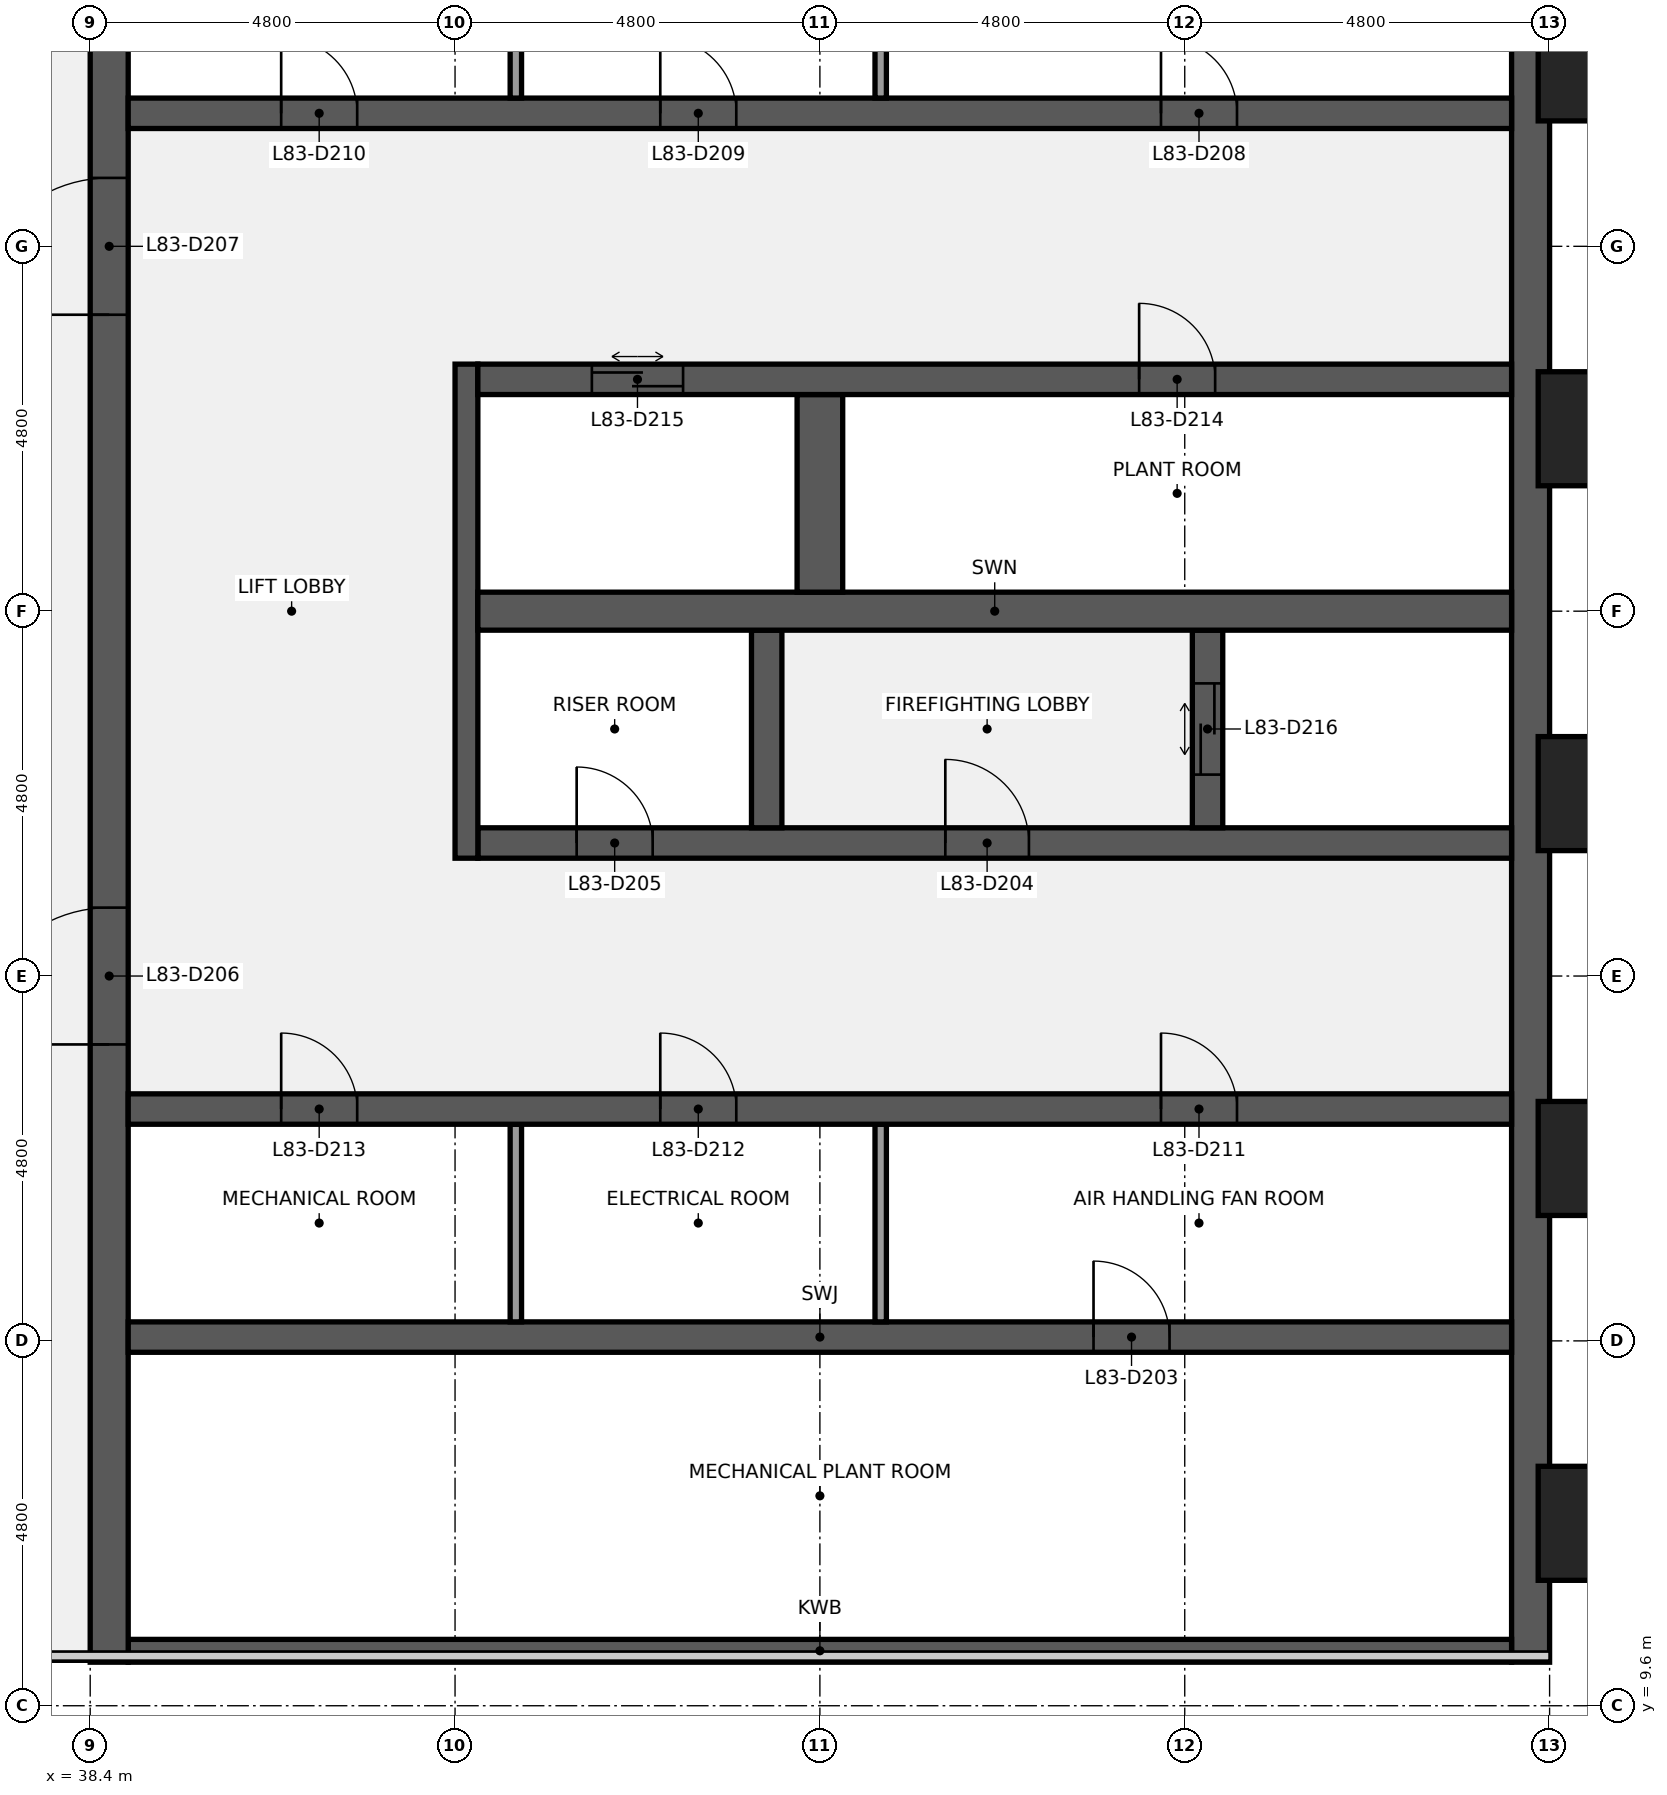
"""IFC4 building model, lengths in metres.
Left out: names, types, materials, properties, quantities, classifications, styles, units other than length and angle.
Written with IfcOpenShell. Run it as: python <this file> out.ifc"""

import sys

from ifc_helpers import new_model, si_unit, direction, frame, frame_2d, origin, origin_2d, place, context, subcontext, project, spatial, polyline, rectangle, outline, extrude, element, fill, save


model = new_model("IFC4")
c1 = context("Model", 3, precision=1e-05, world=origin(), true_north=direction((0.0, 1.0)))
c2 = subcontext(c1, "Body", "Model", "MODEL_VIEW")
j1 = project(units=[si_unit("LENGTHUNIT", "METRE"), si_unit("PLANEANGLEUNIT", "RADIAN")], contexts=[c1])
p1 = place(None, origin())
s1 = spatial("IfcSite", under=j1, at=p1, CompositionType="ELEMENT")
p2 = place(p1, origin())
s2 = spatial("IfcBuilding", under=s1, at=p2, CompositionType="ELEMENT")
p3 = place(p2, frame((0.0, 0.0, 370.3)))
s3 = spatial("IfcBuildingStorey", under=s2, at=p3, CompositionType="ELEMENT", Elevation=370.3)
p4 = place(p3, frame((57.35, 38.4, 0.0), z_axis=(0.0, 0.0, 1.0), x_axis=(0.0, -1.0, 0.0)))
e1 = element("IfcWall", 1, at=p4, inside=s3, PredefinedType="SHEAR", context=c2, shape_type="SweptSolid", body=[
    extrude(outline(polyline([(0.0, 0.0), (28.227, 0.0), (28.227, 2.488), (26.98, 3.75), (0.0, 3.75), (0.0, 0.0)])), frame((0.0, 0.25, 0.0), z_axis=(0.0, -1.0, 0.0), x_axis=(1.0, 0.0, 0.0)), (0.0, 0.0, 1.0), 0.5),
])
p5 = place(p3, frame((57.1, 10.323, 0.0), z_axis=(0.0, 0.0, 1.0), x_axis=(-1.0, 0.0, 0.0)))
e2 = element("IfcWall", 2, at=p5, inside=s3, PredefinedType="SHEAR", context=c2, shape_type="SweptSolid", body=[
    extrude(outline(polyline([(0.0, 0.0), (18.2, 0.0), (18.2, 2.639), (0.0, 2.639), (0.0, 0.0)])), frame((0.0, 0.15, 0.0), z_axis=(0.0, -1.0, 0.0), x_axis=(1.0, 0.0, 0.0)), (0.0, 0.0, 1.0), 0.3),
])
p6 = place(p3, frame((38.65, 10.173, 0.0), z_axis=(0.0, 0.0, 1.0), x_axis=(0.0, 1.0, 0.0)))
e3 = element("IfcWall", 3, at=p6, inside=s3, PredefinedType="SHEAR", context=c2, shape_type="SweptSolid", body=[
    extrude(outline(polyline([(0.0, 0.0), (28.227, 0.0), (28.227, 3.75), (1.247, 3.75), (0.0, 2.488), (0.0, 0.0)])), frame((0.0, 0.25, 0.0), z_axis=(0.0, -1.0, 0.0), x_axis=(1.0, 0.0, 0.0)), (0.0, 0.0, 1.0), 0.5),
])
p7 = place(p6, frame((8.127, 0.0, 0.0)))
e4 = element("IfcOpeningElement", 4, at=p7, cuts=e3, PredefinedType="OPENING", context=c2, shape_type="SweptSolid", body=[
    extrude(rectangle(XDim=1.8, YDim=2.1, at=frame_2d((0.9, 1.05))), frame((0.0, 0.26, 0.0), z_axis=(0.0, -1.0, 0.0), x_axis=(1.0, 0.0, 0.0)), (0.0, 0.0, 1.0), 0.52),
])
p8 = place(p6, frame((17.727, 0.0, 0.0)))
e5 = element("IfcOpeningElement", 5, at=p8, cuts=e3, PredefinedType="OPENING", context=c2, shape_type="SweptSolid", body=[
    extrude(rectangle(XDim=1.8, YDim=2.1, at=frame_2d((0.9, 1.05))), frame((0.0, 0.26, 0.0), z_axis=(0.0, -1.0, 0.0), x_axis=(1.0, 0.0, 0.0)), (0.0, 0.0, 1.0), 0.52),
])
p9 = place(p3, frame((38.9, 14.45, 0.0), z_axis=(0.0, 0.0, 1.0), x_axis=(1.0, 0.0, 0.0)))
e6 = element("IfcWall", 6, at=p9, inside=s3, PredefinedType="SHEAR", context=c2, shape_type="SweptSolid", body=[
    extrude(rectangle(XDim=18.2, YDim=0.4, at=frame_2d((9.1, 0.0))), origin(), (0.0, 0.0, 1.0), 3.75),
])
p10 = place(p9, frame((12.7, 0.0, 0.0)))
e7 = element("IfcOpeningElement", 7, at=p10, cuts=e6, PredefinedType="OPENING", context=c2, shape_type="SweptSolid", body=[
    extrude(rectangle(XDim=1.0, YDim=2.1, at=frame_2d((0.5, 1.05))), frame((0.0, 0.21, 0.0), z_axis=(0.0, -1.0, 0.0), x_axis=(1.0, 0.0, 0.0)), (0.0, 0.0, 1.0), 0.42),
])
for number, where, z_axis, x_axis in (
    (8, (48.8, 14.65, 0.0), (0.0, 0.0, 1.0), (0.0, 1.0, 0.0)),
    (9, (44.0, 14.65, 0.0), (0.0, 0.0, 1.0), (0.0, 1.0, 0.0)),
):
    element("IfcWall", number, at=place(p3, frame(where, z_axis=z_axis, x_axis=x_axis)), inside=s3, PredefinedType="PARTITIONING", context=c2, shape_type="SweptSolid", body=[
        extrude(rectangle(XDim=2.6, YDim=0.15, at=frame_2d((1.3, 0.0))), origin(), (0.0, 0.0, 1.0), 3.75),
    ])
p11 = place(p3, frame((38.9, 17.45, 0.0), z_axis=(0.0, 0.0, 1.0), x_axis=(1.0, 0.0, 0.0)))
e10 = element("IfcWall", 10, at=p11, inside=s3, PredefinedType="SHEAR", context=c2, shape_type="SweptSolid", body=[
    extrude(rectangle(XDim=18.2, YDim=0.4, at=frame_2d((9.1, 0.0))), origin(), (0.0, 0.0, 1.0), 3.75),
])
p12 = place(p11, frame((13.587, 0.0, 0.0)))
e11 = element("IfcOpeningElement", 11, at=p12, cuts=e10, PredefinedType="OPENING", context=c2, shape_type="SweptSolid", body=[
    extrude(rectangle(XDim=1.0, YDim=2.1, at=frame_2d((0.5, 1.05))), frame((0.0, 0.21, 0.0), z_axis=(0.0, -1.0, 0.0), x_axis=(1.0, 0.0, 0.0)), (0.0, 0.0, 1.0), 0.42),
])
p13 = place(p11, frame((7.0, 0.0, 0.0)))
e12 = element("IfcOpeningElement", 12, at=p13, cuts=e10, PredefinedType="OPENING", context=c2, shape_type="SweptSolid", body=[
    extrude(rectangle(XDim=1.0, YDim=2.1, at=frame_2d((0.5, 1.05))), frame((0.0, 0.21, 0.0), z_axis=(0.0, -1.0, 0.0), x_axis=(1.0, 0.0, 0.0)), (0.0, 0.0, 1.0), 0.42),
])
p14 = place(p11, frame((2.012, 0.0, 0.0)))
e13 = element("IfcOpeningElement", 13, at=p14, cuts=e10, PredefinedType="OPENING", context=c2, shape_type="SweptSolid", body=[
    extrude(rectangle(XDim=1.0, YDim=2.1, at=frame_2d((0.5, 1.05))), frame((0.0, 0.21, 0.0), z_axis=(0.0, -1.0, 0.0), x_axis=(1.0, 0.0, 0.0)), (0.0, 0.0, 1.0), 0.42),
])
p15 = place(p3, frame((43.5, 20.95, 0.0), z_axis=(0.0, 0.0, 1.0), x_axis=(1.0, 0.0, 0.0)))
e14 = element("IfcWall", 14, at=p15, inside=s3, PredefinedType="SHEAR", context=c2, shape_type="SweptSolid", body=[
    extrude(rectangle(XDim=13.6, YDim=0.4, at=frame_2d((6.8, 0.0))), origin(), (0.0, 0.0, 1.0), 3.75),
])
p16 = place(p15, frame((6.15, 0.0, 0.0)))
e15 = element("IfcOpeningElement", 15, at=p16, cuts=e14, PredefinedType="OPENING", context=c2, shape_type="SweptSolid", body=[
    extrude(rectangle(XDim=1.1, YDim=2.1, at=frame_2d((0.55, 1.05))), frame((0.0, 0.21, 0.0), z_axis=(0.0, -1.0, 0.0), x_axis=(1.0, 0.0, 0.0)), (0.0, 0.0, 1.0), 0.42),
])
p17 = place(p15, frame((1.3, 0.0, 0.0)))
e16 = element("IfcOpeningElement", 16, at=p17, cuts=e14, PredefinedType="OPENING", context=c2, shape_type="SweptSolid", body=[
    extrude(rectangle(XDim=1.0, YDim=2.1, at=frame_2d((0.5, 1.05))), frame((0.0, 0.21, 0.0), z_axis=(0.0, -1.0, 0.0), x_axis=(1.0, 0.0, 0.0)), (0.0, 0.0, 1.0), 0.42),
])
p18 = place(p3, frame((43.35, 20.75, 0.0), z_axis=(0.0, 0.0, 1.0), x_axis=(0.0, 1.0, 0.0)))
e17 = element("IfcWall", 17, at=p18, inside=s3, PredefinedType="SHEAR", context=c2, shape_type="SweptSolid", body=[
    extrude(rectangle(XDim=6.5, YDim=0.3, at=frame_2d((3.25, 0.0))), origin(), (0.0, 0.0, 1.0), 3.75),
])
p19 = place(p3, frame((53.1, 21.15, 0.0), z_axis=(0.0, 0.0, 1.0), x_axis=(0.0, 1.0, 0.0)))
e18 = element("IfcWall", 18, at=p19, inside=s3, PredefinedType="SHEAR", context=c2, shape_type="SweptSolid", body=[
    extrude(rectangle(XDim=2.6, YDim=0.4, at=frame_2d((1.3, 0.0))), origin(), (0.0, 0.0, 1.0), 3.75),
])
p20 = place(p19, frame((0.7, 0.0, 0.0)))
e19 = element("IfcOpeningElement", 19, at=p20, cuts=e18, PredefinedType="OPENING", context=c2, shape_type="SweptSolid", body=[
    extrude(rectangle(XDim=1.2, YDim=2.1, at=frame_2d((0.6, 1.05))), frame((0.0, 0.21, 0.0), z_axis=(0.0, -1.0, 0.0), x_axis=(1.0, 0.0, 0.0)), (0.0, 0.0, 1.0), 0.42),
])
p21 = place(p3, frame((47.3, 21.15, 0.0), z_axis=(0.0, 0.0, 1.0), x_axis=(0.0, 1.0, 0.0)))
e20 = element("IfcWall", 20, at=p21, inside=s3, PredefinedType="SHEAR", context=c2, shape_type="SweptSolid", body=[
    extrude(rectangle(XDim=2.6, YDim=0.4, at=frame_2d((1.3, 0.0))), origin(), (0.0, 0.0, 1.0), 3.75),
])
p22 = place(p3, frame((43.5, 24.0, 0.0), z_axis=(0.0, 0.0, 1.0), x_axis=(1.0, 0.0, 0.0)))
e21 = element("IfcWall", 21, at=p22, inside=s3, PredefinedType="SHEAR", context=c2, shape_type="SweptSolid", body=[
    extrude(rectangle(XDim=13.6, YDim=0.5, at=frame_2d((6.8, 0.0))), origin(), (0.0, 0.0, 1.0), 3.75),
])
p23 = place(p3, frame((48.0, 24.25, 0.0), z_axis=(0.0, 0.0, 1.0), x_axis=(0.0, 1.0, 0.0)))
e22 = element("IfcWall", 22, at=p23, inside=s3, PredefinedType="SHEAR", context=c2, shape_type="SweptSolid", body=[
    extrude(rectangle(XDim=2.6, YDim=0.6, at=frame_2d((1.3, 0.0))), origin(), (0.0, 0.0, 1.0), 3.75),
])
p24 = place(p3, frame((43.5, 27.05, 0.0), z_axis=(0.0, 0.0, 1.0), x_axis=(1.0, 0.0, 0.0)))
e23 = element("IfcWall", 23, at=p24, inside=s3, PredefinedType="SHEAR", context=c2, shape_type="SweptSolid", body=[
    extrude(rectangle(XDim=13.6, YDim=0.4, at=frame_2d((6.8, 0.0))), origin(), (0.0, 0.0, 1.0), 3.75),
])
p25 = place(p24, frame((8.7, 0.0, 0.0)))
e24 = element("IfcOpeningElement", 24, at=p25, cuts=e23, PredefinedType="OPENING", context=c2, shape_type="SweptSolid", body=[
    extrude(rectangle(XDim=1.0, YDim=2.1, at=frame_2d((0.5, 1.05))), frame((0.0, 0.21, 0.0), z_axis=(0.0, -1.0, 0.0), x_axis=(1.0, 0.0, 0.0)), (0.0, 0.0, 1.0), 0.42),
])
p26 = place(p24, frame((1.5, 0.0, 0.0)))
e25 = element("IfcOpeningElement", 25, at=p26, cuts=e23, PredefinedType="OPENING", context=c2, shape_type="SweptSolid", body=[
    extrude(rectangle(XDim=1.2, YDim=2.1, at=frame_2d((0.6, 1.05))), frame((0.0, 0.21, 0.0), z_axis=(0.0, -1.0, 0.0), x_axis=(1.0, 0.0, 0.0)), (0.0, 0.0, 1.0), 0.42),
])
p27 = place(p3, frame((38.9, 30.55, 0.0), z_axis=(0.0, 0.0, 1.0), x_axis=(1.0, 0.0, 0.0)))
e26 = element("IfcWall", 26, at=p27, inside=s3, PredefinedType="SHEAR", context=c2, shape_type="SweptSolid", body=[
    extrude(rectangle(XDim=18.2, YDim=0.4, at=frame_2d((9.1, 0.0))), origin(), (0.0, 0.0, 1.0), 3.75),
])
p28 = place(p27, frame((13.587, 0.0, 0.0)))
e27 = element("IfcOpeningElement", 27, at=p28, cuts=e26, PredefinedType="OPENING", context=c2, shape_type="SweptSolid", body=[
    extrude(rectangle(XDim=1.0, YDim=2.1, at=frame_2d((0.5, 1.05))), frame((0.0, 0.21, 0.0), z_axis=(0.0, -1.0, 0.0), x_axis=(1.0, 0.0, 0.0)), (0.0, 0.0, 1.0), 0.42),
])
p29 = place(p27, frame((7.0, 0.0, 0.0)))
e28 = element("IfcOpeningElement", 28, at=p29, cuts=e26, PredefinedType="OPENING", context=c2, shape_type="SweptSolid", body=[
    extrude(rectangle(XDim=1.0, YDim=2.1, at=frame_2d((0.5, 1.05))), frame((0.0, 0.21, 0.0), z_axis=(0.0, -1.0, 0.0), x_axis=(1.0, 0.0, 0.0)), (0.0, 0.0, 1.0), 0.42),
])
p30 = place(p27, frame((2.012, 0.0, 0.0)))
e29 = element("IfcOpeningElement", 29, at=p30, cuts=e26, PredefinedType="OPENING", context=c2, shape_type="SweptSolid", body=[
    extrude(rectangle(XDim=1.0, YDim=2.1, at=frame_2d((0.5, 1.05))), frame((0.0, 0.21, 0.0), z_axis=(0.0, -1.0, 0.0), x_axis=(1.0, 0.0, 0.0)), (0.0, 0.0, 1.0), 0.42),
])
for number, where, z_axis, x_axis in (
    (30, (48.8, 30.75, 0.0), (0.0, 0.0, 1.0), (0.0, 1.0, 0.0)),
    (31, (44.0, 30.75, 0.0), (0.0, 0.0, 1.0), (0.0, 1.0, 0.0)),
):
    element("IfcWall", number, at=place(p3, frame(where, z_axis=z_axis, x_axis=x_axis)), inside=s3, PredefinedType="PARTITIONING", context=c2, shape_type="SweptSolid", body=[
        extrude(rectangle(XDim=2.6, YDim=0.15, at=frame_2d((1.3, 0.0))), origin(), (0.0, 0.0, 1.0), 3.75),
    ])
p31 = place(p3, frame((58.35, 12.0, 0.0), z_axis=(0.0, 0.0, 1.0), x_axis=(0.0, 1.0, 0.0)))
e32 = element("IfcColumn", 32, at=p31, inside=s3, PredefinedType="PILASTER", context=c2, shape_type="SweptSolid", body=[
    extrude(rectangle(XDim=1.8, YDim=1.5, at=origin_2d()), origin(), (0.0, 0.0, 1.0), 3.387),
])
for number, where, z_axis, x_axis in (
    (33, (58.35, 16.8, 0.0), (0.0, 0.0, 1.0), (0.0, 1.0, 0.0)),
    (34, (58.35, 21.6, 0.0), (0.0, 0.0, 1.0), (0.0, 1.0, 0.0)),
    (35, (58.35, 26.4, 0.0), (0.0, 0.0, 1.0), (0.0, 1.0, 0.0)),
    (36, (58.35, 31.2, 0.0), (0.0, 0.0, 1.0), (0.0, 1.0, 0.0)),
):
    element("IfcColumn", number, at=place(p3, frame(where, z_axis=z_axis, x_axis=x_axis)), inside=s3, PredefinedType="PILASTER", context=c2, shape_type="SweptSolid", body=[
        extrude(rectangle(XDim=1.8, YDim=1.5, at=origin_2d()), origin(), (0.0, 0.0, 1.0), 4.0),
    ])
p32 = place(p10, origin())
e37 = element("IfcDoor", 37, at=p32, inside=s3, OperationType="SINGLE_SWING_LEFT", PredefinedType="DOOR", context=c2, shape_type="SweptSolid", body=[
    extrude(rectangle(XDim=1.0, YDim=2.1, at=frame_2d((0.5, 1.05))), frame((0.0, 0.025, 0.0), z_axis=(0.0, -1.0, 0.0), x_axis=(1.0, 0.0, 0.0)), (0.0, 0.0, 1.0), 0.05),
])
fill(e7, e37)
p33 = place(p16, origin())
e38 = element("IfcDoor", 38, at=p33, inside=s3, OperationType="SINGLE_SWING_LEFT", PredefinedType="DOOR", context=c2, shape_type="SweptSolid", body=[
    extrude(rectangle(XDim=1.1, YDim=2.1, at=frame_2d((0.55, 1.05))), frame((0.0, 0.025, 0.0), z_axis=(0.0, -1.0, 0.0), x_axis=(1.0, 0.0, 0.0)), (0.0, 0.0, 1.0), 0.05),
])
fill(e15, e38)
p34 = place(p17, origin())
e39 = element("IfcDoor", 39, at=p34, inside=s3, OperationType="SINGLE_SWING_LEFT", PredefinedType="DOOR", context=c2, shape_type="SweptSolid", body=[
    extrude(rectangle(XDim=1.0, YDim=2.1, at=frame_2d((0.5, 1.05))), frame((0.0, 0.025, 0.0), z_axis=(0.0, -1.0, 0.0), x_axis=(1.0, 0.0, 0.0)), (0.0, 0.0, 1.0), 0.05),
])
fill(e16, e39)
p35 = place(p7, origin())
e40 = element("IfcDoor", 40, at=p35, inside=s3, OperationType="DOUBLE_DOOR_SINGLE_SWING", PredefinedType="DOOR", context=c2, shape_type="SweptSolid", body=[
    extrude(rectangle(XDim=1.8, YDim=2.1, at=frame_2d((0.9, 1.05))), frame((0.0, 0.025, 0.0), z_axis=(0.0, -1.0, 0.0), x_axis=(1.0, 0.0, 0.0)), (0.0, 0.0, 1.0), 0.05),
])
fill(e4, e40)
p36 = place(p8, origin())
e41 = element("IfcDoor", 41, at=p36, inside=s3, OperationType="DOUBLE_DOOR_SINGLE_SWING", PredefinedType="DOOR", context=c2, shape_type="SweptSolid", body=[
    extrude(rectangle(XDim=1.8, YDim=2.1, at=frame_2d((0.9, 1.05))), frame((0.0, 0.025, 0.0), z_axis=(0.0, -1.0, 0.0), x_axis=(1.0, 0.0, 0.0)), (0.0, 0.0, 1.0), 0.05),
])
fill(e5, e41)
p37 = place(p28, origin())
e42 = element("IfcDoor", 42, at=p37, inside=s3, OperationType="SINGLE_SWING_LEFT", PredefinedType="DOOR", context=c2, shape_type="SweptSolid", body=[
    extrude(rectangle(XDim=1.0, YDim=2.1, at=frame_2d((0.5, 1.05))), frame((0.0, 0.025, 0.0), z_axis=(0.0, -1.0, 0.0), x_axis=(1.0, 0.0, 0.0)), (0.0, 0.0, 1.0), 0.05),
])
fill(e27, e42)
p38 = place(p29, origin())
e43 = element("IfcDoor", 43, at=p38, inside=s3, OperationType="SINGLE_SWING_LEFT", PredefinedType="DOOR", context=c2, shape_type="SweptSolid", body=[
    extrude(rectangle(XDim=1.0, YDim=2.1, at=frame_2d((0.5, 1.05))), frame((0.0, 0.025, 0.0), z_axis=(0.0, -1.0, 0.0), x_axis=(1.0, 0.0, 0.0)), (0.0, 0.0, 1.0), 0.05),
])
fill(e28, e43)
p39 = place(p30, origin())
e44 = element("IfcDoor", 44, at=p39, inside=s3, OperationType="SINGLE_SWING_LEFT", PredefinedType="DOOR", context=c2, shape_type="SweptSolid", body=[
    extrude(rectangle(XDim=1.0, YDim=2.1, at=frame_2d((0.5, 1.05))), frame((0.0, 0.025, 0.0), z_axis=(0.0, -1.0, 0.0), x_axis=(1.0, 0.0, 0.0)), (0.0, 0.0, 1.0), 0.05),
])
fill(e29, e44)
p40 = place(p12, origin())
e45 = element("IfcDoor", 45, at=p40, inside=s3, OperationType="SINGLE_SWING_LEFT", PredefinedType="DOOR", context=c2, shape_type="SweptSolid", body=[
    extrude(rectangle(XDim=1.0, YDim=2.1, at=frame_2d((0.5, 1.05))), frame((0.0, 0.025, 0.0), z_axis=(0.0, -1.0, 0.0), x_axis=(1.0, 0.0, 0.0)), (0.0, 0.0, 1.0), 0.05),
])
fill(e11, e45)
p41 = place(p13, origin())
e46 = element("IfcDoor", 46, at=p41, inside=s3, OperationType="SINGLE_SWING_LEFT", PredefinedType="DOOR", context=c2, shape_type="SweptSolid", body=[
    extrude(rectangle(XDim=1.0, YDim=2.1, at=frame_2d((0.5, 1.05))), frame((0.0, 0.025, 0.0), z_axis=(0.0, -1.0, 0.0), x_axis=(1.0, 0.0, 0.0)), (0.0, 0.0, 1.0), 0.05),
])
fill(e12, e46)
p42 = place(p14, origin())
e47 = element("IfcDoor", 47, at=p42, inside=s3, OperationType="SINGLE_SWING_LEFT", PredefinedType="DOOR", context=c2, shape_type="SweptSolid", body=[
    extrude(rectangle(XDim=1.0, YDim=2.1, at=frame_2d((0.5, 1.05))), frame((0.0, 0.025, 0.0), z_axis=(0.0, -1.0, 0.0), x_axis=(1.0, 0.0, 0.0)), (0.0, 0.0, 1.0), 0.05),
])
fill(e13, e47)
p43 = place(p25, origin())
e48 = element("IfcDoor", 48, at=p43, inside=s3, OperationType="SINGLE_SWING_LEFT", PredefinedType="DOOR", context=c2, shape_type="SweptSolid", body=[
    extrude(rectangle(XDim=1.0, YDim=2.1, at=frame_2d((0.5, 1.05))), frame((0.0, 0.025, 0.0), z_axis=(0.0, -1.0, 0.0), x_axis=(1.0, 0.0, 0.0)), (0.0, 0.0, 1.0), 0.05),
])
fill(e24, e48)
p44 = place(p26, origin())
e49 = element("IfcDoor", 49, at=p44, inside=s3, OperationType="DOUBLE_DOOR_SLIDING", PredefinedType="DOOR", context=c2, shape_type="SweptSolid", body=[
    extrude(rectangle(XDim=1.2, YDim=2.1, at=frame_2d((0.6, 1.05))), frame((0.0, 0.025, 0.0), z_axis=(0.0, -1.0, 0.0), x_axis=(1.0, 0.0, 0.0)), (0.0, 0.0, 1.0), 0.05),
])
fill(e25, e49)
p45 = place(p20, origin())
e50 = element("IfcDoor", 50, at=p45, inside=s3, OperationType="DOUBLE_DOOR_SLIDING", PredefinedType="DOOR", context=c2, shape_type="SweptSolid", body=[
    extrude(rectangle(XDim=1.2, YDim=2.1, at=frame_2d((0.6, 1.05))), frame((0.0, 0.025, 0.0), z_axis=(0.0, -1.0, 0.0), x_axis=(1.0, 0.0, 0.0)), (0.0, 0.0, 1.0), 0.05),
])
fill(e19, e50)
save(model, sys.argv[1])
